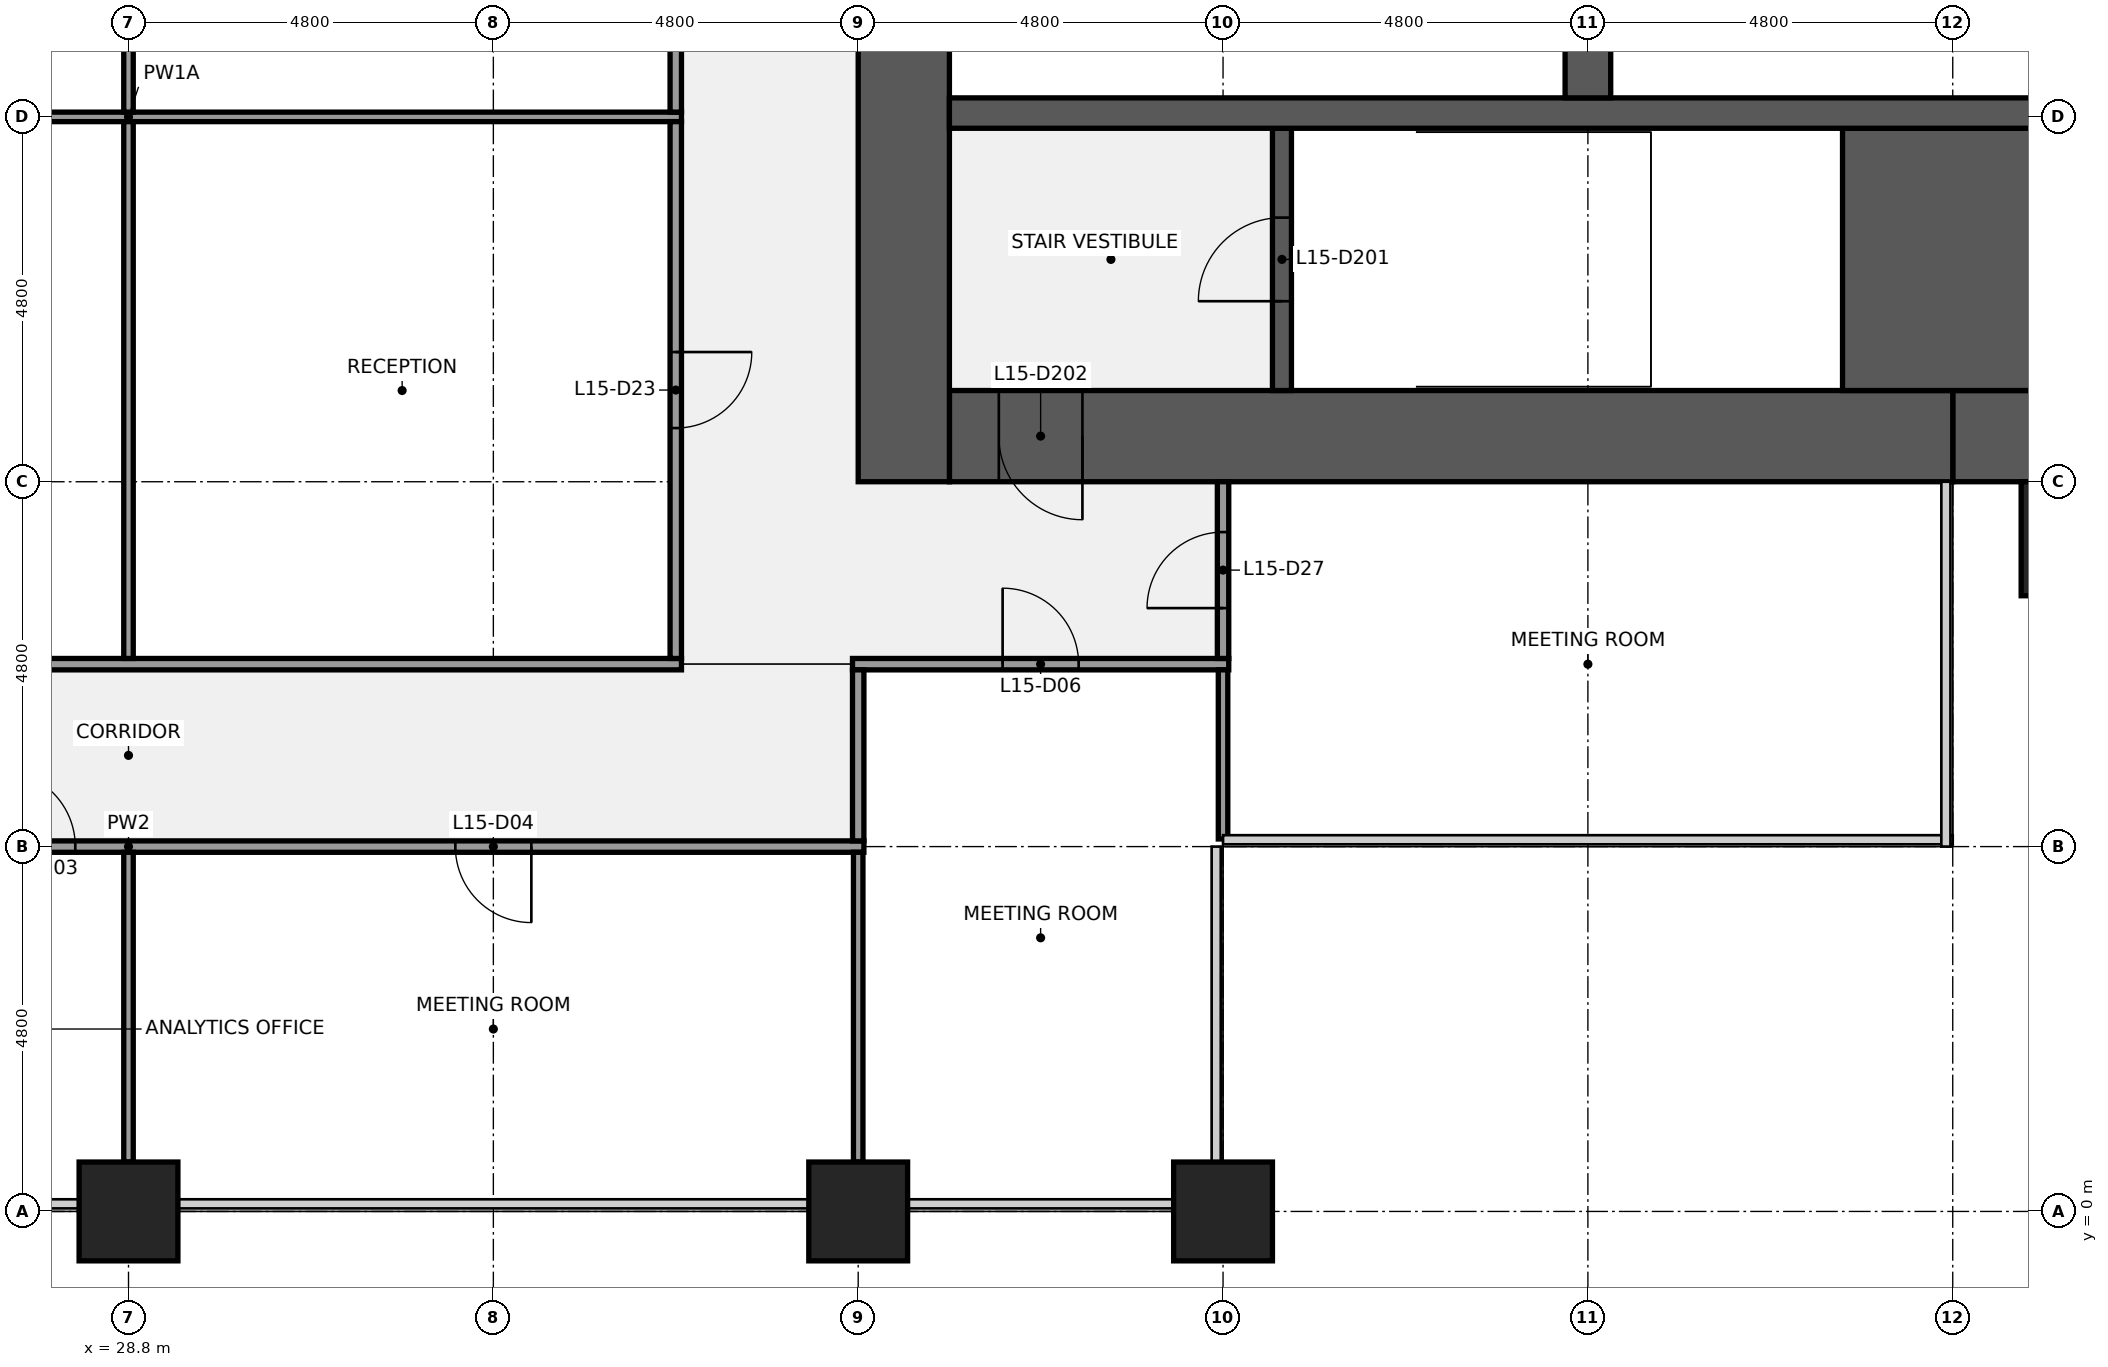
"""IFC4 building model, lengths in metres.
Left out: names, types, materials, properties, quantities, classifications, styles, units other than length and angle.
Written with IfcOpenShell. Run it as: python <this file> out.ifc"""

import sys

from ifc_helpers import new_model, si_unit, direction, frame, frame_2d, origin, origin_2d, place, context, subcontext, project, spatial, rectangle, extrude, element, fill, save


model = new_model("IFC4")
c1 = context("Model", 3, precision=1e-05, world=origin(), true_north=direction((0.0, 1.0)))
c2 = subcontext(c1, "Body", "Model", "MODEL_VIEW")
j1 = project(units=[si_unit("LENGTHUNIT", "METRE"), si_unit("PLANEANGLEUNIT", "RADIAN")], contexts=[c1])
p1 = place(None, origin())
s1 = spatial("IfcSite", under=j1, at=p1, CompositionType="ELEMENT")
p2 = place(p1, origin())
s2 = spatial("IfcBuilding", under=s1, at=p2, CompositionType="ELEMENT")
p3 = place(p2, frame((0.0, 0.0, 71.0)))
s3 = spatial("IfcBuildingStorey", under=s2, at=p3, CompositionType="ELEMENT", Elevation=71.0)
for number, where, z_axis, x_axis in (
    (1, (28.8, 0.0, 0.0), (0.0, 0.0, 1.0), (1.0, 0.0, 0.0)),
    (2, (38.4, 0.0, 0.0), (0.0, 0.0, 1.0), (1.0, 0.0, 0.0)),
    (3, (43.2, 0.0, 0.0), (0.0, 0.0, 1.0), (1.0, 0.0, 0.0)),
):
    element("IfcColumn", number, at=place(p3, frame(where, z_axis=z_axis, x_axis=x_axis)), inside=s3, PredefinedType="COLUMN", context=c2, shape_type="SweptSolid", body=[
        extrude(rectangle(XDim=1.3, YDim=1.3, at=origin_2d()), origin(), (0.0, 0.0, 1.0), 4.0),
    ])
p4 = place(p3, frame((56.4, 10.2, 0.0), z_axis=(0.0, 0.0, 1.0), x_axis=(-1.0, 0.0, 0.0)))
e4 = element("IfcWall", 4, at=p4, inside=s3, PredefinedType="SHEAR", context=c2, shape_type="SweptSolid", body=[
    extrude(rectangle(XDim=3.6, YDim=1.2, at=frame_2d((1.8, 0.0))), origin(), (0.0, 0.0, 1.0), 3.84),
])
p5 = place(p3, frame((52.8, 10.2, 0.0), z_axis=(0.0, 0.0, 1.0), x_axis=(-1.0, 0.0, 0.0)))
e5 = element("IfcWall", 5, at=p5, inside=s3, PredefinedType="SHEAR", context=c2, shape_type="SweptSolid", body=[
    extrude(rectangle(XDim=13.2, YDim=1.2, at=frame_2d((6.6, 0.0))), origin(), (0.0, 0.0, 1.0), 3.84),
])
p6 = place(p5, frame((11.45, 0.0, 0.0)))
e6 = element("IfcOpeningElement", 6, at=p6, cuts=e5, PredefinedType="OPENING", context=c2, shape_type="SweptSolid", body=[
    extrude(rectangle(XDim=1.1, YDim=2.1, at=frame_2d((0.55, 1.05))), frame((0.0, 0.61, 0.0), z_axis=(0.0, -1.0, 0.0), x_axis=(1.0, 0.0, 0.0)), (0.0, 0.0, 1.0), 1.22),
])
p7 = place(p3, frame((39.0, 9.6, 0.0), z_axis=(0.0, 0.0, 1.0), x_axis=(0.0, 1.0, 0.0)))
e7 = element("IfcWall", 7, at=p7, inside=s3, PredefinedType="SHEAR", context=c2, shape_type="SweptSolid", body=[
    extrude(rectangle(XDim=28.8, YDim=1.2, at=frame_2d((14.4, 0.0))), origin(), (0.0, 0.0, 1.0), 3.84),
])
p8 = place(p7, frame((8.7, 0.0, 0.0)))
e8 = element("IfcOpeningElement", 8, at=p8, cuts=e7, PredefinedType="OPENING", context=c2, shape_type="SweptSolid", body=[
    extrude(rectangle(XDim=1.8, YDim=2.1, at=frame_2d((0.9, 1.05))), frame((0.0, 0.61, 0.0), z_axis=(0.0, -1.0, 0.0), x_axis=(1.0, 0.0, 0.0)), (0.0, 0.0, 1.0), 1.22),
])
p9 = place(p7, frame((18.3, 0.0, 0.0)))
e9 = element("IfcOpeningElement", 9, at=p9, cuts=e7, PredefinedType="OPENING", context=c2, shape_type="SweptSolid", body=[
    extrude(rectangle(XDim=1.8, YDim=2.1, at=frame_2d((0.9, 1.05))), frame((0.0, 0.61, 0.0), z_axis=(0.0, -1.0, 0.0), x_axis=(1.0, 0.0, 0.0)), (0.0, 0.0, 1.0), 1.22),
])
p10 = place(p3, frame((51.35, 12.525, 0.0), z_axis=(0.0, 0.0, 1.0), x_axis=(1.0, 0.0, 0.0)))
e10 = element("IfcWall", 10, at=p10, inside=s3, PredefinedType="SHEAR", context=c2, shape_type="SweptSolid", body=[
    extrude(rectangle(XDim=5.05, YDim=3.45, at=frame_2d((2.525, 0.0))), origin(), (0.0, 0.0, 1.0), 3.84),
])
p11 = place(p3, frame((43.975, 10.8, 0.0), z_axis=(0.0, 0.0, 1.0), x_axis=(0.0, 1.0, 0.0)))
e11 = element("IfcWall", 11, at=p11, inside=s3, PredefinedType="SHEAR", context=c2, shape_type="SweptSolid", body=[
    extrude(rectangle(XDim=3.45, YDim=0.25, at=frame_2d((1.725, 0.0))), origin(), (0.0, 0.0, 1.0), 3.84),
])
p12 = place(p11, frame((1.175, 0.0, 0.0)))
e12 = element("IfcOpeningElement", 12, at=p12, cuts=e11, PredefinedType="OPENING", context=c2, shape_type="SweptSolid", body=[
    extrude(rectangle(XDim=1.1, YDim=2.1, at=frame_2d((0.55, 1.05))), frame((0.0, 0.135, 0.0), z_axis=(0.0, -1.0, 0.0), x_axis=(1.0, 0.0, 0.0)), (0.0, 0.0, 1.0), 0.27),
])
p13 = place(p3, frame((39.6, 14.45, 0.0), z_axis=(0.0, 0.0, 1.0), x_axis=(1.0, 0.0, 0.0)))
e13 = element("IfcWall", 13, at=p13, inside=s3, PredefinedType="SHEAR", context=c2, shape_type="SweptSolid", body=[
    extrude(rectangle(XDim=16.8, YDim=0.4, at=frame_2d((8.4, 0.0))), origin(), (0.0, 0.0, 1.0), 3.84),
])
p14 = place(p3, frame((48.0, 14.65, 0.0), z_axis=(0.0, 0.0, 1.0), x_axis=(0.0, 1.0, 0.0)))
e14 = element("IfcWall", 14, at=p14, inside=s3, PredefinedType="SHEAR", context=c2, shape_type="SweptSolid", body=[
    extrude(rectangle(XDim=2.6, YDim=0.6, at=frame_2d((1.3, 0.0))), origin(), (0.0, 0.0, 1.0), 3.84),
])
p15 = place(p3, frame((19.125, 4.8, 0.0), z_axis=(0.0, 0.0, 1.0), x_axis=(1.0, 0.0, 0.0)))
e15 = element("IfcWall", 15, at=p15, inside=s3, PredefinedType="PARTITIONING", context=c2, shape_type="SweptSolid", body=[
    extrude(rectangle(XDim=19.35, YDim=0.15, at=frame_2d((9.675, 0.0))), origin(), (0.0, 0.0, 1.0), 2.87),
])
p16 = place(p15, frame((0.775, 0.0, 0.0)))
e16 = element("IfcOpeningElement", 16, at=p16, cuts=e15, PredefinedType="OPENING", context=c2, shape_type="SweptSolid", body=[
    extrude(rectangle(XDim=1.0, YDim=2.1, at=frame_2d((0.5, 1.05))), frame((0.0, 0.085, 0.0), z_axis=(0.0, -1.0, 0.0), x_axis=(1.0, 0.0, 0.0)), (0.0, 0.0, 1.0), 0.17),
])
p17 = place(p15, frame((4.375, 0.0, 0.0)))
e17 = element("IfcOpeningElement", 17, at=p17, cuts=e15, PredefinedType="OPENING", context=c2, shape_type="SweptSolid", body=[
    extrude(rectangle(XDim=1.0, YDim=2.1, at=frame_2d((0.5, 1.05))), frame((0.0, 0.085, 0.0), z_axis=(0.0, -1.0, 0.0), x_axis=(1.0, 0.0, 0.0)), (0.0, 0.0, 1.0), 0.17),
])
p18 = place(p15, frame((7.975, 0.0, 0.0)))
e18 = element("IfcOpeningElement", 18, at=p18, cuts=e15, PredefinedType="OPENING", context=c2, shape_type="SweptSolid", body=[
    extrude(rectangle(XDim=1.0, YDim=2.1, at=frame_2d((0.5, 1.05))), frame((0.0, 0.085, 0.0), z_axis=(0.0, -1.0, 0.0), x_axis=(1.0, 0.0, 0.0)), (0.0, 0.0, 1.0), 0.17),
])
p19 = place(p15, frame((13.975, 0.0, 0.0)))
e19 = element("IfcOpeningElement", 19, at=p19, cuts=e15, PredefinedType="OPENING", context=c2, shape_type="SweptSolid", body=[
    extrude(rectangle(XDim=1.0, YDim=2.1, at=frame_2d((0.5, 1.05))), frame((0.0, 0.085, 0.0), z_axis=(0.0, -1.0, 0.0), x_axis=(1.0, 0.0, 0.0)), (0.0, 0.0, 1.0), 0.17),
])
p20 = place(p3, frame((21.525, 7.2, 0.0), z_axis=(0.0, 0.0, 1.0), x_axis=(1.0, 0.0, 0.0)))
e20 = element("IfcWall", 20, at=p20, inside=s3, PredefinedType="PARTITIONING", context=c2, shape_type="SweptSolid", body=[
    extrude(rectangle(XDim=14.55, YDim=0.15, at=frame_2d((7.275, 0.0))), origin(), (0.0, 0.0, 1.0), 2.87),
])
p21 = place(p3, frame((38.325, 7.2, 0.0), z_axis=(0.0, 0.0, 1.0), x_axis=(1.0, 0.0, 0.0)))
e21 = element("IfcWall", 21, at=p21, inside=s3, PredefinedType="PARTITIONING", context=c2, shape_type="SweptSolid", body=[
    extrude(rectangle(XDim=4.95, YDim=0.15, at=frame_2d((2.475, 0.0))), origin(), (0.0, 0.0, 1.0), 2.87),
])
p22 = place(p21, frame((1.975, 0.0, 0.0)))
e22 = element("IfcOpeningElement", 22, at=p22, cuts=e21, PredefinedType="OPENING", context=c2, shape_type="SweptSolid", body=[
    extrude(rectangle(XDim=1.0, YDim=2.1, at=frame_2d((0.5, 1.05))), frame((0.0, 0.085, 0.0), z_axis=(0.0, -1.0, 0.0), x_axis=(1.0, 0.0, 0.0)), (0.0, 0.0, 1.0), 0.17),
])
p23 = place(p3, frame((21.525, 14.4, 0.0), z_axis=(0.0, 0.0, 1.0), x_axis=(1.0, 0.0, 0.0)))
e23 = element("IfcWall", 23, at=p23, inside=s3, PredefinedType="PARTITIONING", context=c2, shape_type="SweptSolid", body=[
    extrude(rectangle(XDim=14.55, YDim=0.125, at=frame_2d((7.275, 0.0))), origin(), (0.0, 0.0, 1.0), 2.87),
])
p24 = place(p3, frame((28.8, 0.65, 0.0), z_axis=(0.0, 0.0, 1.0), x_axis=(0.0, 1.0, 0.0)))
e24 = element("IfcWall", 24, at=p24, inside=s3, PredefinedType="PARTITIONING", context=c2, shape_type="SweptSolid", body=[
    extrude(rectangle(XDim=4.075, YDim=0.125, at=frame_2d((2.038, 0.0))), origin(), (0.0, 0.0, 1.0), 2.87),
])
p25 = place(p3, frame((28.8, 7.275, 0.0), z_axis=(0.0, 0.0, 1.0), x_axis=(0.0, 1.0, 0.0)))
e25 = element("IfcWall", 25, at=p25, inside=s3, PredefinedType="PARTITIONING", context=c2, shape_type="SweptSolid", body=[
    extrude(rectangle(XDim=7.062, YDim=0.125, at=frame_2d((3.531, 0.0))), origin(), (0.0, 0.0, 1.0), 2.87),
])
p26 = place(p3, frame((28.8, 14.462, 0.0), z_axis=(0.0, 0.0, 1.0), x_axis=(0.0, 1.0, 0.0)))
e26 = element("IfcWall", 26, at=p26, inside=s3, PredefinedType="PARTITIONING", context=c2, shape_type="SweptSolid", body=[
    extrude(rectangle(XDim=7.075, YDim=0.125, at=frame_2d((3.538, 0.0))), origin(), (0.0, 0.0, 1.0), 2.87),
])
p27 = place(p3, frame((36.0, 7.275, 0.0), z_axis=(0.0, 0.0, 1.0), x_axis=(0.0, 1.0, 0.0)))
e27 = element("IfcWall", 27, at=p27, inside=s3, PredefinedType="PARTITIONING", context=c2, shape_type="SweptSolid", body=[
    extrude(rectangle(XDim=7.062, YDim=0.15, at=frame_2d((3.531, 0.0))), origin(), (0.0, 0.0, 1.0), 2.87),
])
p28 = place(p27, frame((3.031, 0.0, 0.0)))
e28 = element("IfcOpeningElement", 28, at=p28, cuts=e27, PredefinedType="OPENING", context=c2, shape_type="SweptSolid", body=[
    extrude(rectangle(XDim=1.0, YDim=2.1, at=frame_2d((0.5, 1.05))), frame((0.0, 0.085, 0.0), z_axis=(0.0, -1.0, 0.0), x_axis=(1.0, 0.0, 0.0)), (0.0, 0.0, 1.0), 0.17),
])
p29 = place(p3, frame((36.0, 14.462, 0.0), z_axis=(0.0, 0.0, 1.0), x_axis=(0.0, 1.0, 0.0)))
e29 = element("IfcWall", 29, at=p29, inside=s3, PredefinedType="PARTITIONING", context=c2, shape_type="SweptSolid", body=[
    extrude(rectangle(XDim=7.075, YDim=0.15, at=frame_2d((3.538, 0.0))), origin(), (0.0, 0.0, 1.0), 2.87),
])
p30 = place(p29, frame((3.038, 0.0, 0.0)))
e30 = element("IfcOpeningElement", 30, at=p30, cuts=e29, PredefinedType="OPENING", context=c2, shape_type="SweptSolid", body=[
    extrude(rectangle(XDim=1.0, YDim=2.1, at=frame_2d((0.5, 1.05))), frame((0.0, 0.085, 0.0), z_axis=(0.0, -1.0, 0.0), x_axis=(1.0, 0.0, 0.0)), (0.0, 0.0, 1.0), 0.17),
])
p31 = place(p3, frame((38.4, 0.65, 0.0), z_axis=(0.0, 0.0, 1.0), x_axis=(0.0, 1.0, 0.0)))
e31 = element("IfcWall", 31, at=p31, inside=s3, PredefinedType="PARTITIONING", context=c2, shape_type="SweptSolid", body=[
    extrude(rectangle(XDim=4.075, YDim=0.125, at=frame_2d((2.038, 0.0))), origin(), (0.0, 0.0, 1.0), 2.87),
])
p32 = place(p3, frame((38.4, 4.875, 0.0), z_axis=(0.0, 0.0, 1.0), x_axis=(0.0, 1.0, 0.0)))
e32 = element("IfcWall", 32, at=p32, inside=s3, PredefinedType="PARTITIONING", context=c2, shape_type="SweptSolid", body=[
    extrude(rectangle(XDim=2.25, YDim=0.15, at=frame_2d((1.125, 0.0))), origin(), (0.0, 0.0, 1.0), 2.87),
])
p33 = place(p3, frame((43.2, 4.9, 0.0), z_axis=(0.0, 0.0, 1.0), x_axis=(0.0, 1.0, 0.0)))
e33 = element("IfcWall", 33, at=p33, inside=s3, PredefinedType="PARTITIONING", context=c2, shape_type="SweptSolid", body=[
    extrude(rectangle(XDim=2.225, YDim=0.125, at=frame_2d((1.113, 0.0))), origin(), (0.0, 0.0, 1.0), 2.87),
])
p34 = place(p3, frame((43.2, 7.275, 0.0), z_axis=(0.0, 0.0, 1.0), x_axis=(0.0, 1.0, 0.0)))
e34 = element("IfcWall", 34, at=p34, inside=s3, PredefinedType="PARTITIONING", context=c2, shape_type="SweptSolid", body=[
    extrude(rectangle(XDim=2.325, YDim=0.15, at=frame_2d((1.163, 0.0))), origin(), (0.0, 0.0, 1.0), 2.87),
])
p35 = place(p34, frame((0.663, 0.0, 0.0)))
e35 = element("IfcOpeningElement", 35, at=p35, cuts=e34, PredefinedType="OPENING", context=c2, shape_type="SweptSolid", body=[
    extrude(rectangle(XDim=1.0, YDim=2.1, at=frame_2d((0.5, 1.05))), frame((0.0, 0.085, 0.0), z_axis=(0.0, -1.0, 0.0), x_axis=(1.0, 0.0, 0.0)), (0.0, 0.0, 1.0), 0.17),
])
p36 = place(p3, frame((55.2, 8.85, 0.0), z_axis=(0.0, 0.0, 1.0), x_axis=(1.0, 0.0, 0.0)))
e36 = element("IfcColumn", 36, at=p36, inside=s3, PredefinedType="PILASTER", context=c2, shape_type="SweptSolid", body=[
    extrude(rectangle(XDim=3.0, YDim=1.5, at=origin_2d()), origin(), (0.0, 0.0, 1.0), 4.0),
])
for number, where, z_axis, x_axis in (
    (37, (38.4, -1.075, 0.0), (0.0, 0.0, 1.0), (1.0, 0.0, 0.0)),
    (38, (43.2, -1.075, 0.0), (0.0, 0.0, 1.0), (1.0, 0.0, 0.0)),
):
    element("IfcColumn", number, at=place(p3, frame(where, z_axis=z_axis, x_axis=x_axis)), inside=s3, PredefinedType="PILASTER", context=c2, shape_type="SweptSolid", body=[
        extrude(rectangle(XDim=4.2, YDim=0.85, at=origin_2d()), origin(), (0.0, 0.0, 1.0), 4.0),
    ])
p37 = place(p12, origin())
e39 = element("IfcDoor", 39, at=p37, inside=s3, OperationType="SINGLE_SWING_LEFT", PredefinedType="DOOR", context=c2, shape_type="SweptSolid", body=[
    extrude(rectangle(XDim=1.1, YDim=2.1, at=frame_2d((0.55, 1.05))), frame((0.0, 0.025, 0.0), z_axis=(0.0, -1.0, 0.0), x_axis=(1.0, 0.0, 0.0)), (0.0, 0.0, 1.0), 0.05),
])
fill(e12, e39)
p38 = place(p6, origin())
e40 = element("IfcDoor", 40, at=p38, inside=s3, OperationType="SINGLE_SWING_LEFT", PredefinedType="DOOR", context=c2, shape_type="SweptSolid", body=[
    extrude(rectangle(XDim=1.1, YDim=2.1, at=frame_2d((0.55, 1.05))), frame((0.0, 0.025, 0.0), z_axis=(0.0, -1.0, 0.0), x_axis=(1.0, 0.0, 0.0)), (0.0, 0.0, 1.0), 0.05),
])
fill(e6, e40)
p39 = place(p18, origin())
e41 = element("IfcDoor", 41, at=p39, inside=s3, OperationType="SINGLE_SWING_LEFT", PredefinedType="DOOR", context=c2, shape_type="SweptSolid", body=[
    extrude(rectangle(XDim=1.0, YDim=2.1, at=frame_2d((0.5, 1.05))), frame((0.0, 0.025, 0.0), z_axis=(0.0, -1.0, 0.0), x_axis=(1.0, 0.0, 0.0)), (0.0, 0.0, 1.0), 0.05),
])
fill(e18, e41)
p40 = place(p19, origin())
e42 = element("IfcDoor", 42, at=p40, inside=s3, OperationType="SINGLE_SWING_RIGHT", PredefinedType="DOOR", context=c2, shape_type="SweptSolid", body=[
    extrude(rectangle(XDim=1.0, YDim=2.1, at=frame_2d((0.5, 1.05))), frame((0.0, 0.025, 0.0), z_axis=(0.0, -1.0, 0.0), x_axis=(1.0, 0.0, 0.0)), (0.0, 0.0, 1.0), 0.05),
])
fill(e19, e42)
p41 = place(p22, origin())
e43 = element("IfcDoor", 43, at=p41, inside=s3, OperationType="SINGLE_SWING_LEFT", PredefinedType="DOOR", context=c2, shape_type="SweptSolid", body=[
    extrude(rectangle(XDim=1.0, YDim=2.1, at=frame_2d((0.5, 1.05))), frame((0.0, 0.025, 0.0), z_axis=(0.0, -1.0, 0.0), x_axis=(1.0, 0.0, 0.0)), (0.0, 0.0, 1.0), 0.05),
])
fill(e22, e43)
p42 = place(p28, origin())
e44 = element("IfcDoor", 44, at=p42, inside=s3, OperationType="SINGLE_SWING_RIGHT", PredefinedType="DOOR", context=c2, shape_type="SweptSolid", body=[
    extrude(rectangle(XDim=1.0, YDim=2.1, at=frame_2d((0.5, 1.05))), frame((0.0, 0.025, 0.0), z_axis=(0.0, -1.0, 0.0), x_axis=(1.0, 0.0, 0.0)), (0.0, 0.0, 1.0), 0.05),
])
fill(e28, e44)
p43 = place(p35, origin())
e45 = element("IfcDoor", 45, at=p43, inside=s3, OperationType="SINGLE_SWING_LEFT", PredefinedType="DOOR", context=c2, shape_type="SweptSolid", body=[
    extrude(rectangle(XDim=1.0, YDim=2.1, at=frame_2d((0.5, 1.05))), frame((0.0, 0.025, 0.0), z_axis=(0.0, -1.0, 0.0), x_axis=(1.0, 0.0, 0.0)), (0.0, 0.0, 1.0), 0.05),
])
fill(e35, e45)
save(model, sys.argv[1])
